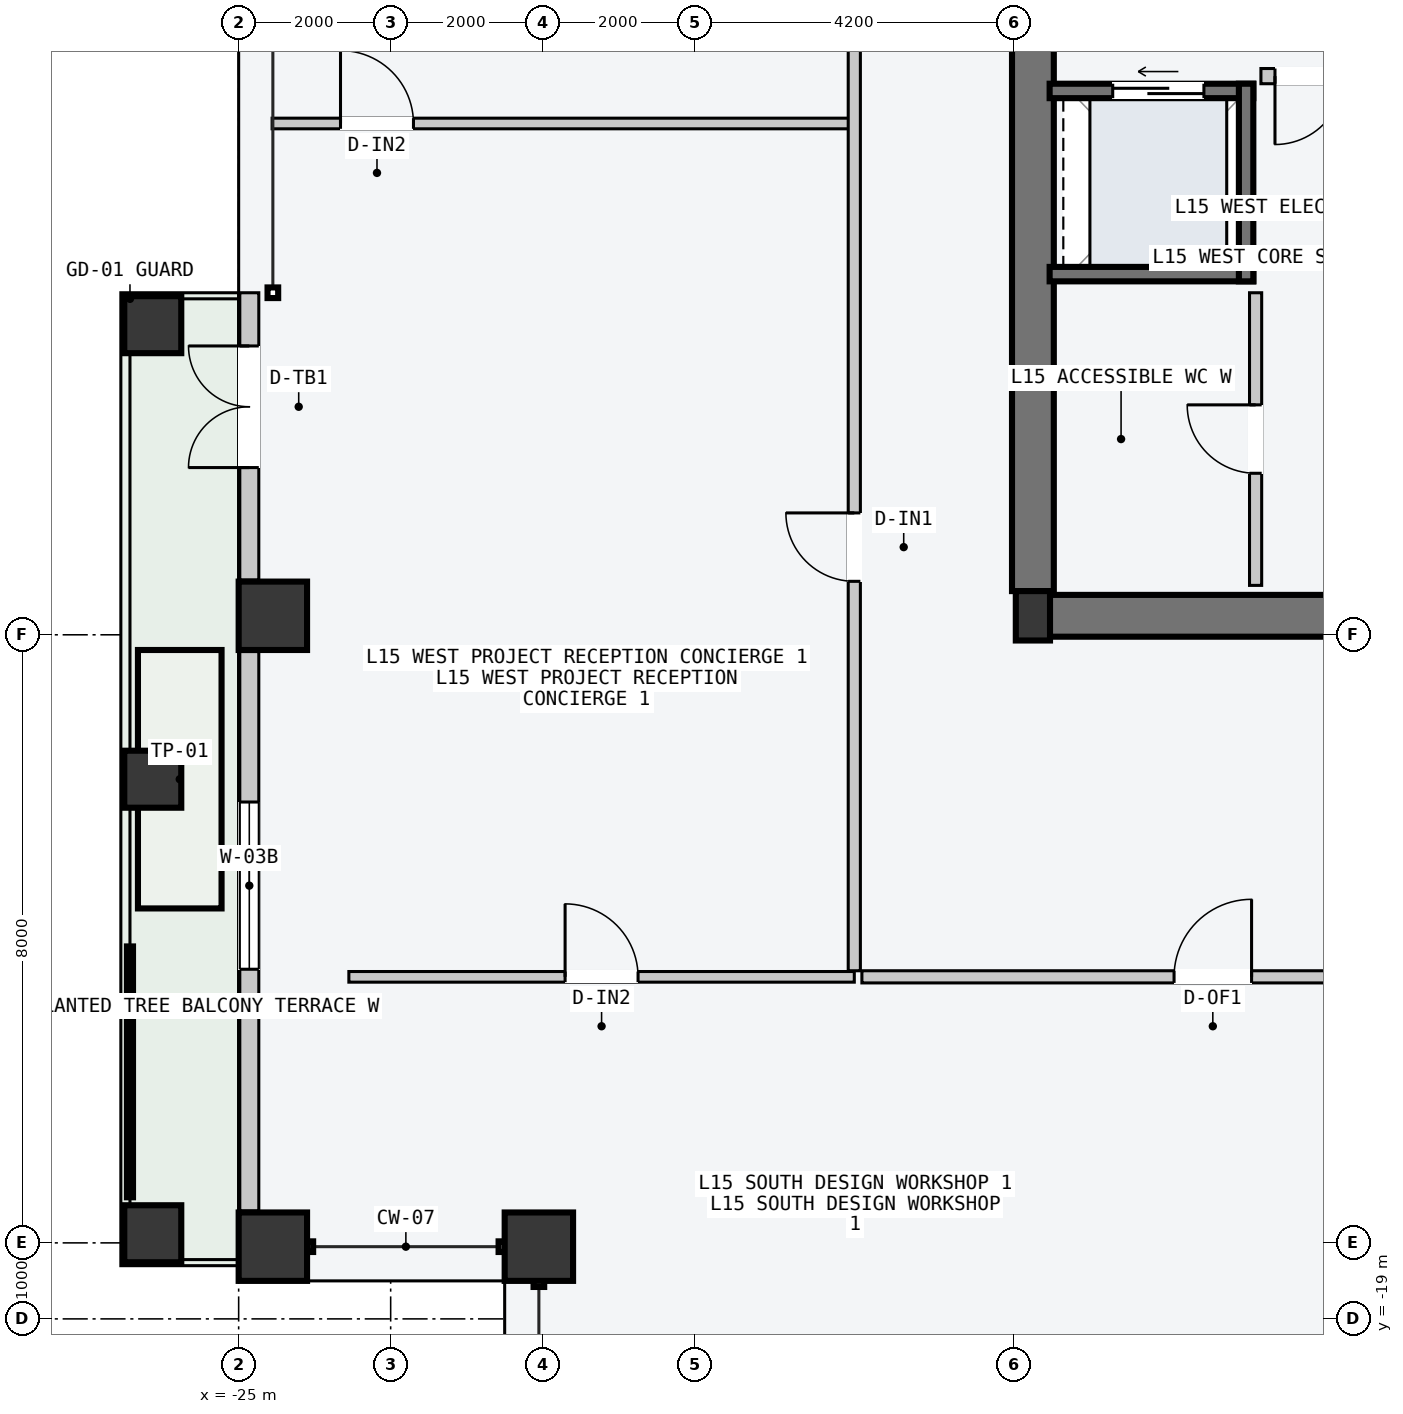
"""IFC4 building model, lengths in metres.
Left out: names, types, materials, properties, quantities, classifications, styles, units other than length and angle.
Written with IfcOpenShell. Run it as: python <this file> out.ifc"""

import sys

from ifc_helpers import new_model, si_unit, direction, frame, frame_2d, origin, origin_2d, place, context, subcontext, project, spatial, rectangle, hollow_rectangle, i_section, extrude, element, fill, save


model = new_model("IFC4")
c1 = context("Model", 3, precision=1e-05, world=origin(), true_north=direction((0.0, 1.0)))
c2 = subcontext(c1, "Body", "Model", "MODEL_VIEW")
j1 = project(units=[si_unit("LENGTHUNIT", "METRE"), si_unit("PLANEANGLEUNIT", "RADIAN")], contexts=[c1])
p1 = place(None, origin())
s1 = spatial("IfcSite", under=j1, at=p1, CompositionType="ELEMENT")
p2 = place(p1, origin())
s2 = spatial("IfcBuilding", under=s1, at=p2, CompositionType="ELEMENT")
p3 = place(p2, frame((0.0, 0.0, 60.0)))
s3 = spatial("IfcBuildingStorey", under=s2, at=p3, CompositionType="ELEMENT", Elevation=60.0)
p4 = place(p3, frame((-14.53, -9.75, -0.2), z_axis=(0.0, 0.0, 1.0), x_axis=(1.0, 0.0, 0.0)))
e1 = element("IfcWall", 1, at=p4, inside=s3, PredefinedType="SHEAR", context=c2, shape_type="SweptSolid", body=[
    extrude(rectangle(XDim=6.46, YDim=0.55, at=frame_2d((3.23, 0.0))), origin(), (0.0, 0.0, 1.0), 3.6),
])
p5 = place(p3, frame((-14.55, -9.425, -0.2), z_axis=(0.0, 0.0, 1.0), x_axis=(0.0, 1.0, 0.0)))
e2 = element("IfcWall", 2, at=p5, inside=s3, PredefinedType="SHEAR", context=c2, shape_type="SweptSolid", body=[
    extrude(rectangle(XDim=9.1, YDim=0.55, at=frame_2d((4.55, 0.0))), origin(), (0.0, 0.0, 1.0), 3.6),
])
p6 = place(p3, frame((-14.55, -9.75, 0.0), z_axis=(0.0, 0.0, 1.0), x_axis=(1.0, 0.0, 0.0)))
e3 = element("IfcColumn", 3, at=p6, inside=s3, PredefinedType="COLUMN", context=c2, shape_type="SweptSolid", body=[
    extrude(i_section(OverallWidth=0.45, OverallDepth=0.65, WebThickness=0.025, FlangeThickness=0.04, at=origin_2d()), origin(), (0.0, 0.0, 1.0), 3.6),
])
for number, where, z_axis, x_axis in (
    (4, (-24.55, -18.05, 0.0), (0.0, 0.0, 1.0), (0.0, 1.0, 0.0)),
    (5, (-24.55, -9.75, 0.0), (0.0, 0.0, 1.0), (0.0, 1.0, 0.0)),
    (6, (-21.05, -18.05, 0.0), (0.0, 0.0, 1.0), (1.0, 0.0, 0.0)),
):
    element("IfcColumn", number, at=place(p3, frame(where, z_axis=z_axis, x_axis=x_axis)), inside=s3, PredefinedType="COLUMN", context=c2, shape_type="SweptSolid", body=[
        extrude(hollow_rectangle(XDim=0.9, YDim=0.9, WallThickness=0.045, at=origin_2d()), origin(), (0.0, 0.0, 1.0), 3.6),
    ])
for number, where, z_axis, x_axis in (
    (7, (-26.13, -17.88, 0.0), (0.0, 0.0, 1.0), (0.0, 1.0, 0.0)),
    (8, (-26.13, -5.92, 0.0), (0.0, 0.0, 1.0), (0.0, 1.0, 0.0)),
    (9, (-26.13, -11.9, 0.0), (0.0, 0.0, 1.0), (0.0, 1.0, 0.0)),
):
    element("IfcColumn", number, at=place(p3, frame(where, z_axis=z_axis, x_axis=x_axis)), inside=s3, PredefinedType="COLUMN", context=c2, shape_type="SweptSolid", body=[
        extrude(hollow_rectangle(XDim=0.75, YDim=0.75, WallThickness=0.032, at=origin_2d()), origin(), (0.0, 0.0, 1.0), 3.6),
    ])
p7 = place(p3, frame((-24.86, -17.58, 0.0), z_axis=(0.0, 0.0, 1.0), x_axis=(0.0, 1.0, 0.0)))
e10 = element("IfcWall", 10, at=p7, inside=s3, PredefinedType="STANDARD", context=c2, shape_type="SweptSolid", body=[
    extrude(rectangle(XDim=7.36, YDim=0.25, at=frame_2d((3.68, 0.0))), origin(), (0.0, 0.0, 1.0), 3.4),
])
p8 = place(p7, frame((3.18, 0.0, 0.85)))
e11 = element("IfcOpeningElement", 11, at=p8, cuts=e10, PredefinedType="OPENING", context=c2, shape_type="SweptSolid", body=[
    extrude(rectangle(XDim=2.2, YDim=2.1, at=frame_2d((1.1, 1.05))), frame((0.0, 0.135, 0.0), z_axis=(0.0, -1.0, 0.0), x_axis=(1.0, 0.0, 0.0)), (0.0, 0.0, 1.0), 0.27),
])
p9 = place(p3, frame((-24.86, -9.28, 0.0), z_axis=(0.0, 0.0, 1.0), x_axis=(0.0, 1.0, 0.0)))
e12 = element("IfcWall", 12, at=p9, inside=s3, PredefinedType="STANDARD", context=c2, shape_type="SweptSolid", body=[
    extrude(rectangle(XDim=3.78, YDim=0.25, at=frame_2d((1.89, 0.0))), origin(), (0.0, 0.0, 1.0), 3.4),
])
p10 = place(p9, frame((1.48, 0.0, 0.0)))
e13 = element("IfcOpeningElement", 13, at=p10, cuts=e12, PredefinedType="OPENING", context=c2, shape_type="SweptSolid", body=[
    extrude(rectangle(XDim=1.6, YDim=2.2, at=frame_2d((0.8, 1.1))), frame((0.0, 0.135, 0.0), z_axis=(0.0, -1.0, 0.0), x_axis=(1.0, 0.0, 0.0)), (0.0, 0.0, 1.0), 0.27),
])
p11 = place(p3, frame((-14.33, -2.845, -0.2), z_axis=(0.0, 0.0, 1.0), x_axis=(1.0, 0.0, 0.0)))
e14 = element("IfcWall", 14, at=p11, inside=s3, PredefinedType="SOLIDWALL", context=c2, shape_type="SweptSolid", body=[
    extrude(rectangle(XDim=2.68, YDim=0.19, at=frame_2d((1.34, 0.0))), origin(), (0.0, 0.0, 1.0), 3.6),
])
p12 = place(p11, frame((0.83, 0.0, 0.2)))
e15 = element("IfcOpeningElement", 15, at=p12, cuts=e14, PredefinedType="OPENING", context=c2, shape_type="SweptSolid", body=[
    extrude(rectangle(XDim=1.2, YDim=2.2, at=frame_2d((0.6, 1.1))), frame((0.0, 0.105, 0.0), z_axis=(0.0, -1.0, 0.0), x_axis=(1.0, 0.0, 0.0)), (0.0, 0.0, 1.0), 0.21),
])
p13 = place(p3, frame((-14.33, -5.255, -0.2), z_axis=(0.0, 0.0, 1.0), x_axis=(1.0, 0.0, 0.0)))
e16 = element("IfcWall", 16, at=p13, inside=s3, PredefinedType="SOLIDWALL", context=c2, shape_type="SweptSolid", body=[
    extrude(rectangle(XDim=2.68, YDim=0.19, at=frame_2d((1.34, 0.0))), origin(), (0.0, 0.0, 1.0), 3.6),
])
p14 = place(p3, frame((-11.745, -5.35, -0.2), z_axis=(0.0, 0.0, 1.0), x_axis=(0.0, 1.0, 0.0)))
e17 = element("IfcWall", 17, at=p14, inside=s3, PredefinedType="SOLIDWALL", context=c2, shape_type="SweptSolid", body=[
    extrude(rectangle(XDim=2.6, YDim=0.19, at=frame_2d((1.3, 0.0))), origin(), (0.0, 0.0, 1.0), 3.6),
])
p15 = place(p3, frame((-10.28, -2.65, 0.0), z_axis=(0.0, 0.0, 1.0), x_axis=(-1.0, 0.0, 0.0)))
e18 = element("IfcWall", 18, at=p15, inside=s3, PredefinedType="PARTITIONING", context=c2, shape_type="SweptSolid", body=[
    extrude(rectangle(XDim=1.27, YDim=0.2, at=frame_2d((0.635, 0.0))), origin(), (0.0, 0.0, 1.0), 3.4),
])
p16 = place(p15, frame((0.185, 0.0, 0.0)))
e19 = element("IfcOpeningElement", 19, at=p16, cuts=e18, PredefinedType="OPENING", context=c2, shape_type="SweptSolid", body=[
    extrude(rectangle(XDim=0.9, YDim=2.15, at=frame_2d((0.45, 1.075))), frame((0.0, 0.11, 0.0), z_axis=(0.0, -1.0, 0.0), x_axis=(1.0, 0.0, 0.0)), (0.0, 0.0, 1.0), 0.22),
])
p17 = place(p3, frame((-11.62, -9.35, 0.0), z_axis=(0.0, 0.0, 1.0), x_axis=(0.0, 1.0, 0.0)))
e20 = element("IfcWall", 20, at=p17, inside=s3, PredefinedType="PARTITIONING", context=c2, shape_type="SweptSolid", body=[
    extrude(rectangle(XDim=3.85, YDim=0.16, at=frame_2d((1.925, 0.0))), origin(), (0.0, 0.0, 1.0), 3.4),
])
p18 = place(p17, frame((1.475, 0.0, 0.0)))
e21 = element("IfcOpeningElement", 21, at=p18, cuts=e20, PredefinedType="OPENING", context=c2, shape_type="SweptSolid", body=[
    extrude(rectangle(XDim=0.9, YDim=2.15, at=frame_2d((0.45, 1.075))), frame((0.0, 0.09, 0.0), z_axis=(0.0, -1.0, 0.0), x_axis=(1.0, 0.0, 0.0)), (0.0, 0.0, 1.0), 0.18),
])
p19 = place(p3, frame((-16.8, -14.5, 0.0), z_axis=(0.0, 0.0, 1.0), x_axis=(1.0, 0.0, 0.0)))
e22 = element("IfcWall", 22, at=p19, inside=s3, PredefinedType="PARTITIONING", context=c2, shape_type="SweptSolid", body=[
    extrude(rectangle(XDim=33.6, YDim=0.16, at=frame_2d((16.8, 0.0))), origin(), (0.0, 0.0, 1.0), 3.4),
])
p20 = place(p19, frame((4.107, 0.0, 0.0)))
e23 = element("IfcOpeningElement", 23, at=p20, cuts=e22, PredefinedType="OPENING", context=c2, shape_type="SweptSolid", body=[
    extrude(rectangle(XDim=1.02, YDim=2.2, at=frame_2d((0.51, 1.1))), frame((0.0, 0.09, 0.0), z_axis=(0.0, -1.0, 0.0), x_axis=(1.0, 0.0, 0.0)), (0.0, 0.0, 1.0), 0.18),
])
p21 = place(p19, frame((13.881, 0.0, 0.0)))
e24 = element("IfcOpeningElement", 24, at=p21, cuts=e22, PredefinedType="OPENING", context=c2, shape_type="SweptSolid", body=[
    extrude(rectangle(XDim=1.06, YDim=2.2, at=frame_2d((0.53, 1.1))), frame((0.0, 0.09, 0.0), z_axis=(0.0, -1.0, 0.0), x_axis=(1.0, 0.0, 0.0)), (0.0, 0.0, 1.0), 0.18),
])
p22 = place(p19, frame((23.547, 0.0, 0.0)))
e25 = element("IfcOpeningElement", 25, at=p22, cuts=e22, PredefinedType="OPENING", context=c2, shape_type="SweptSolid", body=[
    extrude(rectangle(XDim=1.24, YDim=2.24, at=frame_2d((0.62, 1.12))), frame((0.0, 0.09, 0.0), z_axis=(0.0, -1.0, 0.0), x_axis=(1.0, 0.0, 0.0)), (0.0, 0.0, 1.0), 0.18),
])
p23 = place(p19, frame((30.473, 0.0, 0.0)))
e26 = element("IfcOpeningElement", 26, at=p23, cuts=e22, PredefinedType="OPENING", context=c2, shape_type="SweptSolid", body=[
    extrude(rectangle(XDim=1.4, YDim=2.2, at=frame_2d((0.7, 1.1))), frame((0.0, 0.09, 0.0), z_axis=(0.0, -1.0, 0.0), x_axis=(1.0, 0.0, 0.0)), (0.0, 0.0, 1.0), 0.18),
])
p24 = place(p3, frame((-23.55, -14.5, 0.0), z_axis=(0.0, 0.0, 1.0), x_axis=(1.0, 0.0, 0.0)))
e27 = element("IfcWall", 27, at=p24, inside=s3, PredefinedType="PARTITIONING", context=c2, shape_type="SweptSolid", body=[
    extrude(rectangle(XDim=6.65, YDim=0.14, at=frame_2d((3.325, 0.0))), origin(), (0.0, 0.0, 1.0), 3.4),
])
p25 = place(p24, frame((2.845, 0.0, 0.0)))
e28 = element("IfcOpeningElement", 28, at=p25, cuts=e27, PredefinedType="OPENING", context=c2, shape_type="SweptSolid", body=[
    extrude(rectangle(XDim=0.96, YDim=2.18, at=frame_2d((0.48, 1.09))), frame((0.0, 0.08, 0.0), z_axis=(0.0, -1.0, 0.0), x_axis=(1.0, 0.0, 0.0)), (0.0, 0.0, 1.0), 0.16),
])
p26 = place(p3, frame((-24.56, -3.273, 0.0), z_axis=(0.0, 0.0, 1.0), x_axis=(1.0, 0.0, 0.0)))
e29 = element("IfcWall", 29, at=p26, inside=s3, PredefinedType="PARTITIONING", context=c2, shape_type="SweptSolid", body=[
    extrude(rectangle(XDim=7.6, YDim=0.14, at=frame_2d((3.8, 0.0))), origin(), (0.0, 0.0, 1.0), 2.95),
])
p27 = place(p26, frame((0.9, 0.0, 0.0)))
e30 = element("IfcOpeningElement", 30, at=p27, cuts=e29, PredefinedType="OPENING", context=c2, shape_type="SweptSolid", body=[
    extrude(rectangle(XDim=0.96, YDim=2.18, at=frame_2d((0.48, 1.09))), frame((0.0, 0.08, 0.0), z_axis=(0.0, -1.0, 0.0), x_axis=(1.0, 0.0, 0.0)), (0.0, 0.0, 1.0), 0.16),
])
p28 = place(p3, frame((-16.9, -14.42, 0.0), z_axis=(0.0, 0.0, 1.0), x_axis=(0.0, 1.0, 0.0)))
e31 = element("IfcWall", 31, at=p28, inside=s3, PredefinedType="PARTITIONING", context=c2, shape_type="SweptSolid", body=[
    extrude(rectangle(XDim=26.54, YDim=0.16, at=frame_2d((13.27, 0.0))), origin(), (0.0, 0.0, 1.0), 3.4),
])
p29 = place(p28, frame((5.123, 0.0, 0.0)))
e32 = element("IfcOpeningElement", 32, at=p29, cuts=e31, PredefinedType="OPENING", context=c2, shape_type="SweptSolid", body=[
    extrude(rectangle(XDim=0.9, YDim=2.15, at=frame_2d((0.45, 1.075))), frame((0.0, 0.09, 0.0), z_axis=(0.0, -1.0, 0.0), x_axis=(1.0, 0.0, 0.0)), (0.0, 0.0, 1.0), 0.18),
])
p30 = place(p28, frame((18.363, 0.0, 0.0)))
e33 = element("IfcOpeningElement", 33, at=p30, cuts=e31, PredefinedType="OPENING", context=c2, shape_type="SweptSolid", body=[
    extrude(rectangle(XDim=0.96, YDim=2.18, at=frame_2d((0.48, 1.09))), frame((0.0, 0.09, 0.0), z_axis=(0.0, -1.0, 0.0), x_axis=(1.0, 0.0, 0.0)), (0.0, 0.0, 1.0), 0.18),
])
p31 = place(p8, origin())
e34 = element("IfcWindow", 34, at=p31, inside=s3, PartitioningType="SINGLE_PANEL", PredefinedType="WINDOW", context=c2, shape_type="SweptSolid", body=[
    extrude(rectangle(XDim=2.2, YDim=2.1, at=frame_2d((1.1, 1.05))), frame((0.0, 0.03, 0.0), z_axis=(0.0, -1.0, 0.0), x_axis=(1.0, 0.0, 0.0)), (0.0, 0.0, 1.0), 0.06),
])
fill(e11, e34)
p32 = place(p10, origin())
e35 = element("IfcDoor", 35, at=p32, inside=s3, OperationType="DOUBLE_DOOR_SINGLE_SWING", PredefinedType="DOOR", context=c2, shape_type="SweptSolid", body=[
    extrude(rectangle(XDim=1.6, YDim=2.2, at=frame_2d((0.8, 1.1))), frame((0.0, 0.025, 0.0), z_axis=(0.0, -1.0, 0.0), x_axis=(1.0, 0.0, 0.0)), (0.0, 0.0, 1.0), 0.05),
])
fill(e13, e35)
p33 = place(p12, origin())
e36 = element("IfcDoor", 36, at=p33, inside=s3, OperationType="SLIDING_TO_LEFT", PredefinedType="DOOR", context=c2, shape_type="SweptSolid", body=[
    extrude(rectangle(XDim=1.2, YDim=2.2, at=frame_2d((0.6, 1.1))), frame((0.0, 0.025, 0.0), z_axis=(0.0, -1.0, 0.0), x_axis=(1.0, 0.0, 0.0)), (0.0, 0.0, 1.0), 0.05),
])
fill(e15, e36)
p34 = place(p16, origin())
e37 = element("IfcDoor", 37, at=p34, inside=s3, OperationType="SINGLE_SWING_RIGHT", PredefinedType="DOOR", context=c2, shape_type="SweptSolid", body=[
    extrude(rectangle(XDim=0.9, YDim=2.15, at=frame_2d((0.45, 1.075))), frame((0.0, 0.025, 0.0), z_axis=(0.0, -1.0, 0.0), x_axis=(1.0, 0.0, 0.0)), (0.0, 0.0, 1.0), 0.05),
])
fill(e19, e37)
p35 = place(p18, origin())
e38 = element("IfcDoor", 38, at=p35, inside=s3, OperationType="SINGLE_SWING_RIGHT", PredefinedType="DOOR", context=c2, shape_type="SweptSolid", body=[
    extrude(rectangle(XDim=0.9, YDim=2.15, at=frame_2d((0.45, 1.075))), frame((0.0, 0.025, 0.0), z_axis=(0.0, -1.0, 0.0), x_axis=(1.0, 0.0, 0.0)), (0.0, 0.0, 1.0), 0.05),
])
fill(e21, e38)
p36 = place(p20, origin())
e39 = element("IfcDoor", 39, at=p36, inside=s3, OperationType="SINGLE_SWING_RIGHT", PredefinedType="DOOR", context=c2, shape_type="SweptSolid", body=[
    extrude(rectangle(XDim=1.02, YDim=2.2, at=frame_2d((0.51, 1.1))), frame((0.0, 0.025, 0.0), z_axis=(0.0, -1.0, 0.0), x_axis=(1.0, 0.0, 0.0)), (0.0, 0.0, 1.0), 0.05),
])
fill(e23, e39)
p37 = place(p25, origin())
e40 = element("IfcDoor", 40, at=p37, inside=s3, OperationType="SINGLE_SWING_LEFT", PredefinedType="DOOR", context=c2, shape_type="SweptSolid", body=[
    extrude(rectangle(XDim=0.96, YDim=2.18, at=frame_2d((0.48, 1.09))), frame((0.0, 0.025, 0.0), z_axis=(0.0, -1.0, 0.0), x_axis=(1.0, 0.0, 0.0)), (0.0, 0.0, 1.0), 0.05),
])
fill(e28, e40)
p38 = place(p27, origin())
e41 = element("IfcDoor", 41, at=p38, inside=s3, OperationType="SINGLE_SWING_LEFT", PredefinedType="DOOR", context=c2, shape_type="SweptSolid", body=[
    extrude(rectangle(XDim=0.96, YDim=2.18, at=frame_2d((0.48, 1.09))), frame((0.0, 0.025, 0.0), z_axis=(0.0, -1.0, 0.0), x_axis=(1.0, 0.0, 0.0)), (0.0, 0.0, 1.0), 0.05),
])
fill(e30, e41)
p39 = place(p29, origin())
e42 = element("IfcDoor", 42, at=p39, inside=s3, OperationType="SINGLE_SWING_RIGHT", PredefinedType="DOOR", context=c2, shape_type="SweptSolid", body=[
    extrude(rectangle(XDim=0.9, YDim=2.15, at=frame_2d((0.45, 1.075))), frame((0.0, 0.025, 0.0), z_axis=(0.0, -1.0, 0.0), x_axis=(1.0, 0.0, 0.0)), (0.0, 0.0, 1.0), 0.05),
])
fill(e32, e42)
save(model, sys.argv[1])
